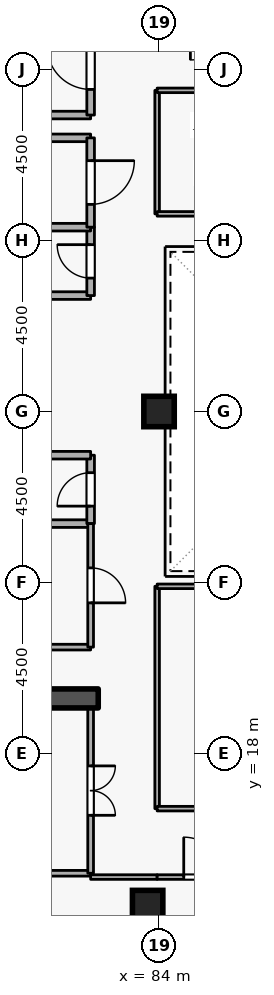
"""IFC4 building model, lengths in metres.
Left out: names, types, materials, properties, quantities, classifications, styles, units other than length and angle.
Written with IfcOpenShell. Run it as: python <this file> out.ifc"""

import sys

from ifc_helpers import new_model, si_unit, direction, frame, frame_2d, origin, origin_2d, place, context, subcontext, project, spatial, rectangle, extrude, element, fill, save


model = new_model("IFC4")
c1 = context("Model", 3, precision=1e-05, world=origin(), true_north=direction((0.0, 1.0)))
c2 = subcontext(c1, "Body", "Model", "MODEL_VIEW")
j1 = project(units=[si_unit("LENGTHUNIT", "METRE"), si_unit("PLANEANGLEUNIT", "RADIAN")], contexts=[c1])
p1 = place(None, origin())
s1 = spatial("IfcSite", under=j1, at=p1, CompositionType="ELEMENT")
p2 = place(p1, origin())
s2 = spatial("IfcBuilding", under=s1, at=p2, CompositionType="ELEMENT")
p3 = place(p2, frame((0.0, 0.0, 254.7)))
s3 = spatial("IfcBuildingStorey", under=s2, at=p3, CompositionType="ELEMENT", Elevation=254.7)
p4 = place(p3, frame((76.6, 19.45, 0.0), z_axis=(0.0, 0.0, 1.0), x_axis=(1.0, 0.0, 0.0)))
e1 = element("IfcWall", 1, at=p4, inside=s3, PredefinedType="SHEAR", context=c2, shape_type="SweptSolid", body=[
    extrude(rectangle(XDim=5.8, YDim=0.5, at=frame_2d((2.9, 0.0))), origin(), (0.0, 0.0, 1.0), 3.6),
])
for number, where, z_axis, x_axis in (
    (2, (83.7, 14.0, 0.0), (0.0, 0.0, 1.0), (1.0, 0.0, 0.0)),
    (3, (84.0, 27.0, 0.0), (0.0, 0.0, 1.0), (1.0, 0.0, 0.0)),
):
    element("IfcColumn", number, at=place(p3, frame(where, z_axis=z_axis, x_axis=x_axis)), inside=s3, PredefinedType="COLUMN", context=c2, shape_type="SweptSolid", body=[
        extrude(rectangle(XDim=0.8, YDim=0.8, at=origin_2d()), origin(), (0.0, 0.0, 1.0), 3.6),
    ])
p5 = place(p3, frame((79.9, 34.8, 0.0), z_axis=(0.0, 0.0, 1.0), x_axis=(1.0, 0.0, 0.0)))
e4 = element("IfcWall", 4, at=p5, inside=s3, PredefinedType="STANDARD", context=c2, shape_type="SweptSolid", body=[
    extrude(rectangle(XDim=2.3, YDim=0.2, at=frame_2d((1.15, 0.0))), origin(), (0.0, 0.0, 1.0), 2.525),
])
p6 = place(p3, frame((82.2, 34.8, 0.0), z_axis=(0.0, 0.0, 1.0), x_axis=(0.0, 1.0, 0.0)))
e5 = element("IfcWall", 5, at=p6, inside=s3, PredefinedType="STANDARD", context=c2, shape_type="SweptSolid", body=[
    extrude(rectangle(XDim=2.5, YDim=0.2, at=frame_2d((1.25, 0.0))), origin(), (0.0, 0.0, 1.0), 3.32),
])
p7 = place(p6, frame((0.675, 0.0, 0.0)))
e6 = element("IfcOpeningElement", 6, at=p7, cuts=e5, PredefinedType="OPENING", context=c2, shape_type="SweptSolid", body=[
    extrude(rectangle(XDim=1.15, YDim=2.1, at=frame_2d((0.575, 1.05))), frame((0.0, 0.11, 0.0), z_axis=(0.0, -1.0, 0.0), x_axis=(1.0, 0.0, 0.0)), (0.0, 0.0, 1.0), 0.22),
])
p8 = place(p3, frame((80.15, 24.05, 0.0), z_axis=(0.0, 0.0, 1.0), x_axis=(1.0, 0.0, 0.0)))
e7 = element("IfcWall", 7, at=p8, inside=s3, PredefinedType="STANDARD", context=c2, shape_type="SweptSolid", body=[
    extrude(rectangle(XDim=2.05, YDim=0.2, at=frame_2d((1.025, 0.0))), origin(), (0.0, 0.0, 1.0), 3.32),
])
p9 = place(p3, frame((82.2, 24.05, 0.0), z_axis=(0.0, 0.0, 1.0), x_axis=(0.0, 1.0, 0.0)))
e8 = element("IfcWall", 8, at=p9, inside=s3, PredefinedType="STANDARD", context=c2, shape_type="SweptSolid", body=[
    extrude(rectangle(XDim=1.8, YDim=0.2, at=frame_2d((0.9, 0.0))), origin(), (0.0, 0.0, 1.0), 3.32),
])
p10 = place(p9, frame((0.46, 0.0, 0.0)))
e9 = element("IfcOpeningElement", 9, at=p10, cuts=e8, PredefinedType="OPENING", context=c2, shape_type="SweptSolid", body=[
    extrude(rectangle(XDim=0.88, YDim=2.04, at=frame_2d((0.44, 1.02))), frame((0.0, 0.11, 0.0), z_axis=(0.0, -1.0, 0.0), x_axis=(1.0, 0.0, 0.0)), (0.0, 0.0, 1.0), 0.22),
])
for number, where, z_axis, x_axis in (
    (10, (82.2, 25.85, 0.0), (0.0, 0.0, 1.0), (-1.0, 0.0, 0.0)),
    (11, (80.15, 30.05, 0.0), (0.0, 0.0, 1.0), (1.0, 0.0, 0.0)),
):
    element("IfcWall", number, at=place(p3, frame(where, z_axis=z_axis, x_axis=x_axis)), inside=s3, PredefinedType="STANDARD", context=c2, shape_type="SweptSolid", body=[
        extrude(rectangle(XDim=2.05, YDim=0.2, at=frame_2d((1.025, 0.0))), origin(), (0.0, 0.0, 1.0), 3.32),
    ])
p11 = place(p3, frame((82.2, 30.05, 0.0), z_axis=(0.0, 0.0, 1.0), x_axis=(0.0, 1.0, 0.0)))
e12 = element("IfcWall", 12, at=p11, inside=s3, PredefinedType="STANDARD", context=c2, shape_type="SweptSolid", body=[
    extrude(rectangle(XDim=1.8, YDim=0.2, at=frame_2d((0.9, 0.0))), origin(), (0.0, 0.0, 1.0), 3.32),
])
p12 = place(p11, frame((0.46, 0.0, 0.0)))
e13 = element("IfcOpeningElement", 13, at=p12, cuts=e12, PredefinedType="OPENING", context=c2, shape_type="SweptSolid", body=[
    extrude(rectangle(XDim=0.88, YDim=2.04, at=frame_2d((0.44, 1.02))), frame((0.0, 0.11, 0.0), z_axis=(0.0, -1.0, 0.0), x_axis=(1.0, 0.0, 0.0)), (0.0, 0.0, 1.0), 0.22),
])
p13 = place(p3, frame((82.2, 31.85, 0.0), z_axis=(0.0, 0.0, 1.0), x_axis=(-1.0, 0.0, 0.0)))
e14 = element("IfcWall", 14, at=p13, inside=s3, PredefinedType="STANDARD", context=c2, shape_type="SweptSolid", body=[
    extrude(rectangle(XDim=2.05, YDim=0.2, at=frame_2d((1.025, 0.0))), origin(), (0.0, 0.0, 1.0), 3.32),
])
p14 = place(p3, frame((80.15, 34.2, 0.0), z_axis=(0.0, 0.0, 1.0), x_axis=(1.0, 0.0, 0.0)))
e15 = element("IfcWall", 15, at=p14, inside=s3, PredefinedType="STANDARD", context=c2, shape_type="SweptSolid", body=[
    extrude(rectangle(XDim=2.05, YDim=0.2, at=frame_2d((1.025, 0.0))), origin(), (0.0, 0.0, 1.0), 2.525),
])
p15 = place(p3, frame((82.2, 34.2, 0.0), z_axis=(0.0, 0.0, 1.0), x_axis=(0.0, -1.0, 0.0)))
e16 = element("IfcWall", 16, at=p15, inside=s3, PredefinedType="STANDARD", context=c2, shape_type="SweptSolid", body=[
    extrude(rectangle(XDim=2.35, YDim=0.2, at=frame_2d((1.175, 0.0))), origin(), (0.0, 0.0, 1.0), 3.32),
])
p16 = place(p15, frame((0.6, 0.0, 0.0)))
e17 = element("IfcOpeningElement", 17, at=p16, cuts=e16, PredefinedType="OPENING", context=c2, shape_type="SweptSolid", body=[
    extrude(rectangle(XDim=1.15, YDim=2.1, at=frame_2d((0.575, 1.05))), frame((0.0, 0.11, 0.0), z_axis=(0.0, -1.0, 0.0), x_axis=(1.0, 0.0, 0.0)), (0.0, 0.0, 1.0), 0.22),
])
p17 = place(p3, frame((82.2, 20.8, 0.0), z_axis=(0.0, 0.0, 1.0), x_axis=(-1.0, 0.0, 0.0)))
e18 = element("IfcWall", 18, at=p17, inside=s3, PredefinedType="PARTITIONING", context=c2, shape_type="SweptSolid", body=[
    extrude(rectangle(XDim=2.05, YDim=0.15, at=frame_2d((1.025, 0.0))), origin(), (0.0, 0.0, 1.0), 3.32),
])
p18 = place(p3, frame((82.2, 24.05, 0.0), z_axis=(0.0, 0.0, 1.0), x_axis=(0.0, -1.0, 0.0)))
e19 = element("IfcWall", 19, at=p18, inside=s3, PredefinedType="PARTITIONING", context=c2, shape_type="SweptSolid", body=[
    extrude(rectangle(XDim=3.25, YDim=0.15, at=frame_2d((1.625, 0.0))), origin(), (0.0, 0.0, 1.0), 3.32),
])
p19 = place(p18, frame((1.165, 0.0, 0.0)))
e20 = element("IfcOpeningElement", 20, at=p19, cuts=e19, PredefinedType="OPENING", context=c2, shape_type="SweptSolid", body=[
    extrude(rectangle(XDim=0.92, YDim=2.08, at=frame_2d((0.46, 1.04))), frame((0.0, 0.085, 0.0), z_axis=(0.0, -1.0, 0.0), x_axis=(1.0, 0.0, 0.0)), (0.0, 0.0, 1.0), 0.17),
])
p20 = place(p3, frame((82.2, 14.85, 0.0), z_axis=(0.0, 0.0, 1.0), x_axis=(-1.0, 0.0, 0.0)))
e21 = element("IfcWall", 21, at=p20, inside=s3, PredefinedType="PARTITIONING", context=c2, shape_type="SweptSolid", body=[
    extrude(rectangle(XDim=11.42, YDim=0.15, at=frame_2d((5.71, 0.0))), origin(), (0.0, 0.0, 1.0), 3.32),
])
p21 = place(p3, frame((82.2, 19.2, 0.0), z_axis=(0.0, 0.0, 1.0), x_axis=(0.0, -1.0, 0.0)))
e22 = element("IfcWall", 22, at=p21, inside=s3, PredefinedType="PARTITIONING", context=c2, shape_type="SweptSolid", body=[
    extrude(rectangle(XDim=4.35, YDim=0.15, at=frame_2d((2.175, 0.0))), origin(), (0.0, 0.0, 1.0), 3.32),
])
p22 = place(p21, frame((1.525, 0.0, 0.0)))
e23 = element("IfcOpeningElement", 23, at=p22, cuts=e22, PredefinedType="OPENING", context=c2, shape_type="SweptSolid", body=[
    extrude(rectangle(XDim=1.3, YDim=2.12, at=frame_2d((0.65, 1.06))), frame((0.0, 0.085, 0.0), z_axis=(0.0, -1.0, 0.0), x_axis=(1.0, 0.0, 0.0)), (0.0, 0.0, 1.0), 0.17),
])
p23 = place(p3, frame((82.2, 14.75, 0.0), z_axis=(0.0, 0.0, 1.0), x_axis=(1.0, 0.0, 0.0)))
e24 = element("IfcWall", 24, at=p23, inside=s3, PredefinedType="PARTITIONING", context=c2, shape_type="SweptSolid", body=[
    extrude(rectangle(XDim=1.75, YDim=0.12, at=frame_2d((0.875, 0.0))), origin(), (0.0, 0.0, 1.0), 3.32),
])
p24 = place(p3, frame((83.95, 14.75, 0.0), z_axis=(0.0, 0.0, 1.0), x_axis=(1.0, 0.0, 0.0)))
e25 = element("IfcWall", 25, at=p24, inside=s3, PredefinedType="PARTITIONING", context=c2, shape_type="SweptSolid", body=[
    extrude(rectangle(XDim=2.45, YDim=0.12, at=frame_2d((1.225, 0.0))), origin(), (0.0, 0.0, 1.0), 3.32),
])
p25 = place(p24, frame((0.7, 0.0, 0.0)))
e26 = element("IfcOpeningElement", 26, at=p25, cuts=e25, PredefinedType="OPENING", context=c2, shape_type="SweptSolid", body=[
    extrude(rectangle(XDim=1.05, YDim=2.1, at=frame_2d((0.525, 1.05))), frame((0.0, 0.07, 0.0), z_axis=(0.0, -1.0, 0.0), x_axis=(1.0, 0.0, 0.0)), (0.0, 0.0, 1.0), 0.14),
])
p26 = place(p3, frame((83.95, 16.55, 0.0), z_axis=(0.0, 0.0, 1.0), x_axis=(0.0, 1.0, 0.0)))
e27 = element("IfcWall", 27, at=p26, inside=s3, PredefinedType="PARTITIONING", context=c2, shape_type="SweptSolid", body=[
    extrude(rectangle(XDim=5.85, YDim=0.12, at=frame_2d((2.925, 0.0))), origin(), (0.0, 0.0, 1.0), 3.32),
])
p27 = place(p3, frame((83.95, 22.4, 0.0), z_axis=(0.0, 0.0, 1.0), x_axis=(1.0, 0.0, 0.0)))
e28 = element("IfcWall", 28, at=p27, inside=s3, PredefinedType="PARTITIONING", context=c2, shape_type="SweptSolid", body=[
    extrude(rectangle(XDim=9.1, YDim=0.12, at=frame_2d((4.55, 0.0))), origin(), (0.0, 0.0, 1.0), 3.32),
])
p28 = place(p3, frame((93.05, 16.55, 0.0), z_axis=(0.0, 0.0, 1.0), x_axis=(-1.0, 0.0, 0.0)))
e29 = element("IfcWall", 29, at=p28, inside=s3, PredefinedType="PARTITIONING", context=c2, shape_type="SweptSolid", body=[
    extrude(rectangle(XDim=9.1, YDim=0.12, at=frame_2d((4.55, 0.0))), origin(), (0.0, 0.0, 1.0), 3.32),
])
p29 = place(p28, frame((4.075, 0.0, 0.0)))
e30 = element("IfcOpeningElement", 30, at=p29, cuts=e29, PredefinedType="OPENING", context=c2, shape_type="SweptSolid", body=[
    extrude(rectangle(XDim=0.95, YDim=2.1, at=frame_2d((0.475, 1.05))), frame((0.0, 0.07, 0.0), z_axis=(0.0, -1.0, 0.0), x_axis=(1.0, 0.0, 0.0)), (0.0, 0.0, 1.0), 0.14),
])
p30 = place(p3, frame((83.95, 32.2, 0.0), z_axis=(0.0, 0.0, 1.0), x_axis=(0.0, 1.0, 0.0)))
e31 = element("IfcWall", 31, at=p30, inside=s3, PredefinedType="PARTITIONING", context=c2, shape_type="SweptSolid", body=[
    extrude(rectangle(XDim=3.25, YDim=0.12, at=frame_2d((1.625, 0.0))), origin(), (0.0, 0.0, 1.0), 3.32),
])
p31 = place(p3, frame((83.95, 35.45, 0.0), z_axis=(0.0, 0.0, 1.0), x_axis=(1.0, 0.0, 0.0)))
e32 = element("IfcWall", 32, at=p31, inside=s3, PredefinedType="PARTITIONING", context=c2, shape_type="SweptSolid", body=[
    extrude(rectangle(XDim=9.1, YDim=0.12, at=frame_2d((4.55, 0.0))), origin(), (0.0, 0.0, 1.0), 3.32),
])
p32 = place(p31, frame((4.075, 0.0, 0.0)))
e33 = element("IfcOpeningElement", 33, at=p32, cuts=e32, PredefinedType="OPENING", context=c2, shape_type="SweptSolid", body=[
    extrude(rectangle(XDim=0.95, YDim=2.1, at=frame_2d((0.475, 1.05))), frame((0.0, 0.07, 0.0), z_axis=(0.0, -1.0, 0.0), x_axis=(1.0, 0.0, 0.0)), (0.0, 0.0, 1.0), 0.14),
])
p33 = place(p3, frame((93.05, 32.2, 0.0), z_axis=(0.0, 0.0, 1.0), x_axis=(-1.0, 0.0, 0.0)))
e34 = element("IfcWall", 34, at=p33, inside=s3, PredefinedType="PARTITIONING", context=c2, shape_type="SweptSolid", body=[
    extrude(rectangle(XDim=9.1, YDim=0.12, at=frame_2d((4.55, 0.0))), origin(), (0.0, 0.0, 1.0), 3.32),
])
p34 = place(p7, origin())
e35 = element("IfcDoor", 35, at=p34, inside=s3, OperationType="SINGLE_SWING_RIGHT", PredefinedType="DOOR", context=c2, shape_type="SweptSolid", body=[
    extrude(rectangle(XDim=1.15, YDim=2.1, at=frame_2d((0.575, 1.05))), frame((0.0, 0.025, 0.0), z_axis=(0.0, -1.0, 0.0), x_axis=(1.0, 0.0, 0.0)), (0.0, 0.0, 1.0), 0.05),
])
fill(e6, e35)
p35 = place(p10, origin())
e36 = element("IfcDoor", 36, at=p35, inside=s3, OperationType="SINGLE_SWING_LEFT", PredefinedType="DOOR", context=c2, shape_type="SweptSolid", body=[
    extrude(rectangle(XDim=0.88, YDim=2.04, at=frame_2d((0.44, 1.02))), frame((0.0, 0.025, 0.0), z_axis=(0.0, -1.0, 0.0), x_axis=(1.0, 0.0, 0.0)), (0.0, 0.0, 1.0), 0.05),
])
fill(e9, e36)
p36 = place(p12, origin())
e37 = element("IfcDoor", 37, at=p36, inside=s3, OperationType="SINGLE_SWING_RIGHT", PredefinedType="DOOR", context=c2, shape_type="SweptSolid", body=[
    extrude(rectangle(XDim=0.88, YDim=2.04, at=frame_2d((0.44, 1.02))), frame((0.0, 0.025, 0.0), z_axis=(0.0, -1.0, 0.0), x_axis=(1.0, 0.0, 0.0)), (0.0, 0.0, 1.0), 0.05),
])
fill(e13, e37)
p37 = place(p19, origin())
e38 = element("IfcDoor", 38, at=p37, inside=s3, OperationType="SINGLE_SWING_RIGHT", PredefinedType="DOOR", context=c2, shape_type="SweptSolid", body=[
    extrude(rectangle(XDim=0.92, YDim=2.08, at=frame_2d((0.46, 1.04))), frame((0.0, 0.025, 0.0), z_axis=(0.0, -1.0, 0.0), x_axis=(1.0, 0.0, 0.0)), (0.0, 0.0, 1.0), 0.05),
])
fill(e20, e38)
p38 = place(p16, origin())
e39 = element("IfcDoor", 39, at=p38, inside=s3, OperationType="SINGLE_SWING_LEFT", PredefinedType="DOOR", context=c2, shape_type="SweptSolid", body=[
    extrude(rectangle(XDim=1.15, YDim=2.1, at=frame_2d((0.575, 1.05))), frame((0.0, 0.025, 0.0), z_axis=(0.0, -1.0, 0.0), x_axis=(1.0, 0.0, 0.0)), (0.0, 0.0, 1.0), 0.05),
])
fill(e17, e39)
p39 = place(p22, origin())
e40 = element("IfcDoor", 40, at=p39, inside=s3, OperationType="DOUBLE_DOOR_SINGLE_SWING", PredefinedType="DOOR", context=c2, shape_type="SweptSolid", body=[
    extrude(rectangle(XDim=1.3, YDim=2.12, at=frame_2d((0.65, 1.06))), frame((0.0, 0.025, 0.0), z_axis=(0.0, -1.0, 0.0), x_axis=(1.0, 0.0, 0.0)), (0.0, 0.0, 1.0), 0.05),
])
fill(e23, e40)
p40 = place(p25, origin())
e41 = element("IfcDoor", 41, at=p40, inside=s3, OperationType="SINGLE_SWING_LEFT", PredefinedType="DOOR", context=c2, shape_type="SweptSolid", body=[
    extrude(rectangle(XDim=1.05, YDim=2.1, at=frame_2d((0.525, 1.05))), frame((0.0, 0.025, 0.0), z_axis=(0.0, -1.0, 0.0), x_axis=(1.0, 0.0, 0.0)), (0.0, 0.0, 1.0), 0.05),
])
fill(e26, e41)
save(model, sys.argv[1])
